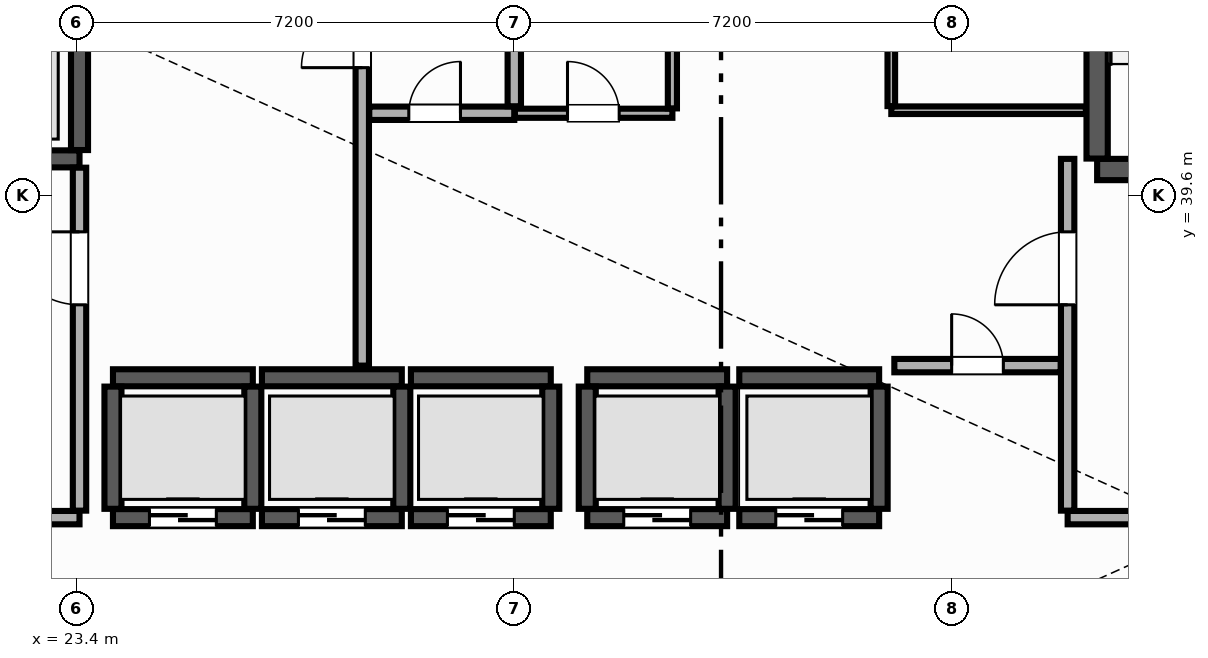
"""IFC4 building model, lengths in metres.
Left out: names, types, materials, properties, quantities, classifications, styles, units other than length and angle.
Written with IfcOpenShell. Run it as: python <this file> out.ifc"""

import sys

from ifc_helpers import new_model, si_unit, direction, frame, frame_2d, origin, place, context, subcontext, project, spatial, rectangle, extrude, element, fill, save


model = new_model("IFC4")
c1 = context("Model", 3, precision=1e-05, world=origin(), true_north=direction((0.0, 1.0)))
c2 = subcontext(c1, "Body", "Model", "MODEL_VIEW")
j1 = project(units=[si_unit("LENGTHUNIT", "METRE"), si_unit("PLANEANGLEUNIT", "RADIAN")], contexts=[c1])
p1 = place(None, origin())
s1 = spatial("IfcSite", under=j1, at=p1, CompositionType="ELEMENT")
p2 = place(p1, origin())
s2 = spatial("IfcBuilding", under=s1, at=p2, CompositionType="ELEMENT")
p3 = place(p2, origin())
s3 = spatial("IfcBuildingStorey", under=s2, at=p3, CompositionType="ELEMENT", Elevation=0.0)
p4 = place(p3, frame((40.185, 40.025, 0.0), z_axis=(0.0, 0.0, 1.0), x_axis=(1.0, 0.0, 0.0)))
e1 = element("IfcWall", 1, at=p4, inside=s3, PredefinedType="SHEAR", context=c2, shape_type="SweptSolid", body=[
    extrude(rectangle(XDim=3.63, YDim=0.35, at=frame_2d((1.815, 0.0))), origin(), (0.0, 0.0, 1.0), 7.68),
])
p5 = place(p4, frame((1.24, 0.0, 0.0)))
e2 = element("IfcOpeningElement", 2, at=p5, cuts=e1, PredefinedType="OPENING", context=c2, shape_type="SweptSolid", body=[
    extrude(rectangle(XDim=1.15, YDim=2.15, at=frame_2d((0.575, 1.075))), frame((0.0, 0.185, 0.0), z_axis=(0.0, -1.0, 0.0), x_axis=(1.0, 0.0, 0.0)), (0.0, 0.0, 1.0), 0.37),
])
p6 = place(p3, frame((40.185, 40.205, 0.0), z_axis=(0.0, 0.0, 1.0), x_axis=(0.0, 1.0, 0.0)))
e3 = element("IfcWall", 3, at=p6, inside=s3, PredefinedType="SHEAR", context=c2, shape_type="SweptSolid", body=[
    extrude(rectangle(XDim=8.09, YDim=0.35, at=frame_2d((4.045, 0.0))), origin(), (0.0, 0.0, 1.0), 7.68),
])
p7 = place(p3, frame((24.0, 34.3, 0.0), z_axis=(0.0, 0.0, 1.0), x_axis=(1.0, 0.0, 0.0)))
e4 = element("IfcWall", 4, at=p7, inside=s3, PredefinedType="SHEAR", context=c2, shape_type="SweptSolid", body=[
    extrude(rectangle(XDim=2.3, YDim=0.28, at=frame_2d((1.15, 0.0))), origin(), (0.0, 0.0, 1.0), 7.68),
])
p8 = place(p7, frame((0.6, 0.0, 0.0)))
e5 = element("IfcOpeningElement", 5, at=p8, cuts=e4, PredefinedType="OPENING", context=c2, shape_type="SweptSolid", body=[
    extrude(rectangle(XDim=1.1, YDim=2.2, at=frame_2d((0.55, 1.1))), frame((0.0, 0.15, 0.0), z_axis=(0.0, -1.0, 0.0), x_axis=(1.0, 0.0, 0.0)), (0.0, 0.0, 1.0), 0.3),
])
p9 = place(p3, frame((24.0, 36.6, 0.0), z_axis=(0.0, 0.0, 1.0), x_axis=(1.0, 0.0, 0.0)))
e6 = element("IfcWall", 6, at=p9, inside=s3, PredefinedType="SHEAR", context=c2, shape_type="SweptSolid", body=[
    extrude(rectangle(XDim=2.3, YDim=0.28, at=frame_2d((1.15, 0.0))), origin(), (0.0, 0.0, 1.0), 7.68),
])
for number, where, z_axis, x_axis in (
    (7, (24.0, 34.445, 0.0), (0.0, 0.0, 1.0), (0.0, 1.0, 0.0)),
    (8, (26.3, 34.445, 0.0), (0.0, 0.0, 1.0), (0.0, 1.0, 0.0)),
):
    element("IfcWall", number, at=place(p3, frame(where, z_axis=z_axis, x_axis=x_axis)), inside=s3, PredefinedType="SHEAR", context=c2, shape_type="SweptSolid", body=[
        extrude(rectangle(XDim=2.01, YDim=0.28, at=frame_2d((1.005, 0.0))), origin(), (0.0, 0.0, 1.0), 7.68),
    ])
p10 = place(p3, frame((26.45, 34.3, 0.0), z_axis=(0.0, 0.0, 1.0), x_axis=(1.0, 0.0, 0.0)))
e9 = element("IfcWall", 9, at=p10, inside=s3, PredefinedType="SHEAR", context=c2, shape_type="SweptSolid", body=[
    extrude(rectangle(XDim=2.3, YDim=0.28, at=frame_2d((1.15, 0.0))), origin(), (0.0, 0.0, 1.0), 7.68),
])
p11 = place(p10, frame((0.6, 0.0, 0.0)))
e10 = element("IfcOpeningElement", 10, at=p11, cuts=e9, PredefinedType="OPENING", context=c2, shape_type="SweptSolid", body=[
    extrude(rectangle(XDim=1.1, YDim=2.2, at=frame_2d((0.55, 1.1))), frame((0.0, 0.15, 0.0), z_axis=(0.0, -1.0, 0.0), x_axis=(1.0, 0.0, 0.0)), (0.0, 0.0, 1.0), 0.3),
])
p12 = place(p3, frame((26.45, 36.6, 0.0), z_axis=(0.0, 0.0, 1.0), x_axis=(1.0, 0.0, 0.0)))
e11 = element("IfcWall", 11, at=p12, inside=s3, PredefinedType="SHEAR", context=c2, shape_type="SweptSolid", body=[
    extrude(rectangle(XDim=2.3, YDim=0.28, at=frame_2d((1.15, 0.0))), origin(), (0.0, 0.0, 1.0), 7.68),
])
p13 = place(p3, frame((28.75, 34.445, 0.0), z_axis=(0.0, 0.0, 1.0), x_axis=(0.0, 1.0, 0.0)))
e12 = element("IfcWall", 12, at=p13, inside=s3, PredefinedType="SHEAR", context=c2, shape_type="SweptSolid", body=[
    extrude(rectangle(XDim=2.01, YDim=0.28, at=frame_2d((1.005, 0.0))), origin(), (0.0, 0.0, 1.0), 7.68),
])
p14 = place(p3, frame((28.9, 34.3, 0.0), z_axis=(0.0, 0.0, 1.0), x_axis=(1.0, 0.0, 0.0)))
e13 = element("IfcWall", 13, at=p14, inside=s3, PredefinedType="SHEAR", context=c2, shape_type="SweptSolid", body=[
    extrude(rectangle(XDim=2.3, YDim=0.28, at=frame_2d((1.15, 0.0))), origin(), (0.0, 0.0, 1.0), 7.68),
])
p15 = place(p14, frame((0.6, 0.0, 0.0)))
e14 = element("IfcOpeningElement", 14, at=p15, cuts=e13, PredefinedType="OPENING", context=c2, shape_type="SweptSolid", body=[
    extrude(rectangle(XDim=1.1, YDim=2.2, at=frame_2d((0.55, 1.1))), frame((0.0, 0.15, 0.0), z_axis=(0.0, -1.0, 0.0), x_axis=(1.0, 0.0, 0.0)), (0.0, 0.0, 1.0), 0.3),
])
p16 = place(p3, frame((28.9, 36.6, 0.0), z_axis=(0.0, 0.0, 1.0), x_axis=(1.0, 0.0, 0.0)))
e15 = element("IfcWall", 15, at=p16, inside=s3, PredefinedType="SHEAR", context=c2, shape_type="SweptSolid", body=[
    extrude(rectangle(XDim=2.3, YDim=0.28, at=frame_2d((1.15, 0.0))), origin(), (0.0, 0.0, 1.0), 7.68),
])
p17 = place(p3, frame((31.2, 34.445, 0.0), z_axis=(0.0, 0.0, 1.0), x_axis=(0.0, 1.0, 0.0)))
e16 = element("IfcWall", 16, at=p17, inside=s3, PredefinedType="SHEAR", context=c2, shape_type="SweptSolid", body=[
    extrude(rectangle(XDim=2.01, YDim=0.28, at=frame_2d((1.005, 0.0))), origin(), (0.0, 0.0, 1.0), 7.68),
])
p18 = place(p3, frame((31.8, 34.3, 0.0), z_axis=(0.0, 0.0, 1.0), x_axis=(1.0, 0.0, 0.0)))
e17 = element("IfcWall", 17, at=p18, inside=s3, PredefinedType="SHEAR", context=c2, shape_type="SweptSolid", body=[
    extrude(rectangle(XDim=2.3, YDim=0.28, at=frame_2d((1.15, 0.0))), origin(), (0.0, 0.0, 1.0), 7.68),
])
p19 = place(p18, frame((0.6, 0.0, 0.0)))
e18 = element("IfcOpeningElement", 18, at=p19, cuts=e17, PredefinedType="OPENING", context=c2, shape_type="SweptSolid", body=[
    extrude(rectangle(XDim=1.1, YDim=2.2, at=frame_2d((0.55, 1.1))), frame((0.0, 0.15, 0.0), z_axis=(0.0, -1.0, 0.0), x_axis=(1.0, 0.0, 0.0)), (0.0, 0.0, 1.0), 0.3),
])
p20 = place(p3, frame((31.8, 36.6, 0.0), z_axis=(0.0, 0.0, 1.0), x_axis=(1.0, 0.0, 0.0)))
e19 = element("IfcWall", 19, at=p20, inside=s3, PredefinedType="SHEAR", context=c2, shape_type="SweptSolid", body=[
    extrude(rectangle(XDim=2.3, YDim=0.28, at=frame_2d((1.15, 0.0))), origin(), (0.0, 0.0, 1.0), 7.68),
])
for number, where, z_axis, x_axis in (
    (20, (31.8, 34.445, 0.0), (0.0, 0.0, 1.0), (0.0, 1.0, 0.0)),
    (21, (34.1, 34.445, 0.0), (0.0, 0.0, 1.0), (0.0, 1.0, 0.0)),
):
    element("IfcWall", number, at=place(p3, frame(where, z_axis=z_axis, x_axis=x_axis)), inside=s3, PredefinedType="SHEAR", context=c2, shape_type="SweptSolid", body=[
        extrude(rectangle(XDim=2.01, YDim=0.28, at=frame_2d((1.005, 0.0))), origin(), (0.0, 0.0, 1.0), 7.68),
    ])
p21 = place(p3, frame((34.3, 34.3, 0.0), z_axis=(0.0, 0.0, 1.0), x_axis=(1.0, 0.0, 0.0)))
e22 = element("IfcWall", 22, at=p21, inside=s3, PredefinedType="SHEAR", context=c2, shape_type="SweptSolid", body=[
    extrude(rectangle(XDim=2.3, YDim=0.28, at=frame_2d((1.15, 0.0))), origin(), (0.0, 0.0, 1.0), 7.68),
])
p22 = place(p21, frame((0.6, 0.0, 0.0)))
e23 = element("IfcOpeningElement", 23, at=p22, cuts=e22, PredefinedType="OPENING", context=c2, shape_type="SweptSolid", body=[
    extrude(rectangle(XDim=1.1, YDim=2.2, at=frame_2d((0.55, 1.1))), frame((0.0, 0.15, 0.0), z_axis=(0.0, -1.0, 0.0), x_axis=(1.0, 0.0, 0.0)), (0.0, 0.0, 1.0), 0.3),
])
p23 = place(p3, frame((34.3, 36.6, 0.0), z_axis=(0.0, 0.0, 1.0), x_axis=(1.0, 0.0, 0.0)))
e24 = element("IfcWall", 24, at=p23, inside=s3, PredefinedType="SHEAR", context=c2, shape_type="SweptSolid", body=[
    extrude(rectangle(XDim=2.3, YDim=0.28, at=frame_2d((1.15, 0.0))), origin(), (0.0, 0.0, 1.0), 7.68),
])
p24 = place(p3, frame((36.6, 34.445, 0.0), z_axis=(0.0, 0.0, 1.0), x_axis=(0.0, 1.0, 0.0)))
e25 = element("IfcWall", 25, at=p24, inside=s3, PredefinedType="SHEAR", context=c2, shape_type="SweptSolid", body=[
    extrude(rectangle(XDim=2.01, YDim=0.28, at=frame_2d((1.005, 0.0))), origin(), (0.0, 0.0, 1.0), 7.68),
])
p25 = place(p3, frame((21.035, 40.2, 0.0), z_axis=(0.0, 0.0, 1.0), x_axis=(1.0, 0.0, 0.0)))
e26 = element("IfcWall", 26, at=p25, inside=s3, PredefinedType="SHEAR", context=c2, shape_type="SweptSolid", body=[
    extrude(rectangle(XDim=2.415, YDim=0.28, at=frame_2d((1.208, 0.0))), origin(), (0.0, 0.0, 1.0), 7.68),
])
p26 = place(p25, frame((0.54, 0.0, 0.0)))
e27 = element("IfcOpeningElement", 27, at=p26, cuts=e26, PredefinedType="OPENING", context=c2, shape_type="SweptSolid", body=[
    extrude(rectangle(XDim=1.3, YDim=2.3, at=frame_2d((0.65, 1.15))), frame((0.0, 0.15, 0.0), z_axis=(0.0, -1.0, 0.0), x_axis=(1.0, 0.0, 0.0)), (0.0, 0.0, 1.0), 0.3),
])
p27 = place(p3, frame((23.45, 40.345, 0.0), z_axis=(0.0, 0.0, 1.0), x_axis=(0.0, 1.0, 0.0)))
e28 = element("IfcWall", 28, at=p27, inside=s3, PredefinedType="SHEAR", context=c2, shape_type="SweptSolid", body=[
    extrude(rectangle(XDim=2.81, YDim=0.28, at=frame_2d((1.405, 0.0))), origin(), (0.0, 0.0, 1.0), 7.68),
])
p28 = place(p3, frame((17.4, 34.3, 0.0), z_axis=(0.0, 0.0, 1.0), x_axis=(1.0, 0.0, 0.0)))
e29 = element("IfcWall", 29, at=p28, inside=s3, PredefinedType="PARTITIONING", context=c2, shape_type="SweptSolid", body=[
    extrude(rectangle(XDim=6.05, YDim=0.22, at=frame_2d((3.025, 0.0))), origin(), (0.0, 0.0, 1.0), 7.68),
])
p29 = place(p28, frame((2.2, 0.0, 0.0)))
e30 = element("IfcOpeningElement", 30, at=p29, cuts=e29, PredefinedType="OPENING", context=c2, shape_type="SweptSolid", body=[
    extrude(rectangle(XDim=1.2, YDim=2.15, at=frame_2d((0.6, 1.075))), frame((0.0, 0.12, 0.0), z_axis=(0.0, -1.0, 0.0), x_axis=(1.0, 0.0, 0.0)), (0.0, 0.0, 1.0), 0.24),
])
p30 = place(p3, frame((23.45, 34.415, 0.0), z_axis=(0.0, 0.0, 1.0), x_axis=(0.0, 1.0, 0.0)))
e31 = element("IfcWall", 31, at=p30, inside=s3, PredefinedType="PARTITIONING", context=c2, shape_type="SweptSolid", body=[
    extrude(rectangle(XDim=5.64, YDim=0.22, at=frame_2d((2.82, 0.0))), origin(), (0.0, 0.0, 1.0), 7.68),
])
p31 = place(p30, frame((3.385, 0.0, 0.0)))
e32 = element("IfcOpeningElement", 32, at=p31, cuts=e31, PredefinedType="OPENING", context=c2, shape_type="SweptSolid", body=[
    extrude(rectangle(XDim=1.2, YDim=2.15, at=frame_2d((0.6, 1.075))), frame((0.0, 0.12, 0.0), z_axis=(0.0, -1.0, 0.0), x_axis=(1.0, 0.0, 0.0)), (0.0, 0.0, 1.0), 0.24),
])
p32 = place(p3, frame((39.7, 34.3, 0.0), z_axis=(0.0, 0.0, 1.0), x_axis=(1.0, 0.0, 0.0)))
e33 = element("IfcWall", 33, at=p32, inside=s3, PredefinedType="PARTITIONING", context=c2, shape_type="SweptSolid", body=[
    extrude(rectangle(XDim=4.6, YDim=0.22, at=frame_2d((2.3, 0.0))), origin(), (0.0, 0.0, 1.0), 7.68),
])
p33 = place(p32, frame((1.7, 0.0, 0.0)))
e34 = element("IfcOpeningElement", 34, at=p33, cuts=e33, PredefinedType="OPENING", context=c2, shape_type="SweptSolid", body=[
    extrude(rectangle(XDim=1.2, YDim=2.15, at=frame_2d((0.6, 1.075))), frame((0.0, 0.12, 0.0), z_axis=(0.0, -1.0, 0.0), x_axis=(1.0, 0.0, 0.0)), (0.0, 0.0, 1.0), 0.24),
])
p34 = place(p3, frame((39.7, 34.415, 0.0), z_axis=(0.0, 0.0, 1.0), x_axis=(0.0, 1.0, 0.0)))
e35 = element("IfcWall", 35, at=p34, inside=s3, PredefinedType="PARTITIONING", context=c2, shape_type="SweptSolid", body=[
    extrude(rectangle(XDim=5.785, YDim=0.22, at=frame_2d((2.893, 0.0))), origin(), (0.0, 0.0, 1.0), 7.68),
])
p35 = place(p34, frame((3.385, 0.0, 0.0)))
e36 = element("IfcOpeningElement", 36, at=p35, cuts=e35, PredefinedType="OPENING", context=c2, shape_type="SweptSolid", body=[
    extrude(rectangle(XDim=1.2, YDim=2.15, at=frame_2d((0.6, 1.075))), frame((0.0, 0.12, 0.0), z_axis=(0.0, -1.0, 0.0), x_axis=(1.0, 0.0, 0.0)), (0.0, 0.0, 1.0), 0.24),
])
p36 = place(p3, frame((28.1, 36.8, 0.0), z_axis=(0.0, 0.0, 1.0), x_axis=(0.0, 1.0, 0.0)))
e37 = element("IfcWall", 37, at=p36, inside=s3, PredefinedType="PARTITIONING", context=c2, shape_type="SweptSolid", body=[
    extrude(rectangle(XDim=12.045, YDim=0.22, at=frame_2d((6.022, 0.0))), origin(), (0.0, 0.0, 1.0), 7.68),
])
p37 = place(p36, frame((4.9, 0.0, 0.0)))
e38 = element("IfcOpeningElement", 38, at=p37, cuts=e37, PredefinedType="OPENING", context=c2, shape_type="SweptSolid", body=[
    extrude(rectangle(XDim=1.0, YDim=2.15, at=frame_2d((0.5, 1.075))), frame((0.0, 0.12, 0.0), z_axis=(0.0, -1.0, 0.0), x_axis=(1.0, 0.0, 0.0)), (0.0, 0.0, 1.0), 0.24),
])
p38 = place(p3, frame((28.215, 40.95, 0.0), z_axis=(0.0, 0.0, 1.0), x_axis=(1.0, 0.0, 0.0)))
e39 = element("IfcWall", 39, at=p38, inside=s3, PredefinedType="PARTITIONING", context=c2, shape_type="SweptSolid", body=[
    extrude(rectangle(XDim=2.385, YDim=0.22, at=frame_2d((1.192, 0.0))), origin(), (0.0, 0.0, 1.0), 7.68),
])
p39 = place(p38, frame((0.65, 0.0, 0.0)))
e40 = element("IfcOpeningElement", 40, at=p39, cuts=e39, PredefinedType="OPENING", context=c2, shape_type="SweptSolid", body=[
    extrude(rectangle(XDim=0.85, YDim=2.1, at=frame_2d((0.425, 1.05))), frame((0.0, 0.12, 0.0), z_axis=(0.0, -1.0, 0.0), x_axis=(1.0, 0.0, 0.0)), (0.0, 0.0, 1.0), 0.24),
])
p40 = place(p3, frame((30.6, 41.065, 0.0), z_axis=(0.0, 0.0, 1.0), x_axis=(0.0, 1.0, 0.0)))
e41 = element("IfcWall", 41, at=p40, inside=s3, PredefinedType="PARTITIONING", context=c2, shape_type="SweptSolid", body=[
    extrude(rectangle(XDim=7.78, YDim=0.22, at=frame_2d((3.89, 0.0))), origin(), (0.0, 0.0, 1.0), 7.68),
])
p41 = place(p3, frame((30.61, 40.95, 0.0), z_axis=(0.0, 0.0, 1.0), x_axis=(1.0, 0.0, 0.0)))
e42 = element("IfcWall", 42, at=p41, inside=s3, PredefinedType="PARTITIONING", context=c2, shape_type="SweptSolid", body=[
    extrude(rectangle(XDim=2.59, YDim=0.15, at=frame_2d((1.295, 0.0))), origin(), (0.0, 0.0, 1.0), 7.68),
])
p42 = place(p41, frame((0.865, 0.0, 0.0)))
e43 = element("IfcOpeningElement", 43, at=p42, cuts=e42, PredefinedType="OPENING", context=c2, shape_type="SweptSolid", body=[
    extrude(rectangle(XDim=0.85, YDim=2.1, at=frame_2d((0.425, 1.05))), frame((0.0, 0.085, 0.0), z_axis=(0.0, -1.0, 0.0), x_axis=(1.0, 0.0, 0.0)), (0.0, 0.0, 1.0), 0.17),
])
p43 = place(p3, frame((33.2, 41.03, 0.0), z_axis=(0.0, 0.0, 1.0), x_axis=(0.0, 1.0, 0.0)))
e44 = element("IfcWall", 44, at=p43, inside=s3, PredefinedType="PARTITIONING", context=c2, shape_type="SweptSolid", body=[
    extrude(rectangle(XDim=7.815, YDim=0.15, at=frame_2d((3.907, 0.0))), origin(), (0.0, 0.0, 1.0), 7.68),
])
p44 = place(p3, frame((36.8, 41.0, 0.0), z_axis=(0.0, 0.0, 1.0), x_axis=(1.0, 0.0, 0.0)))
e45 = element("IfcWall", 45, at=p44, inside=s3, PredefinedType="PARTITIONING", context=c2, shape_type="SweptSolid", body=[
    extrude(rectangle(XDim=3.2, YDim=0.125, at=frame_2d((1.6, 0.0))), origin(), (0.0, 0.0, 1.0), 7.68),
])
p45 = place(p3, frame((36.8, 41.067, 0.0), z_axis=(0.0, 0.0, 1.0), x_axis=(0.0, 1.0, 0.0)))
e46 = element("IfcWall", 46, at=p45, inside=s3, PredefinedType="PARTITIONING", context=c2, shape_type="SweptSolid", body=[
    extrude(rectangle(XDim=3.665, YDim=0.125, at=frame_2d((1.833, 0.0))), origin(), (0.0, 0.0, 1.0), 7.68),
])
p46 = place(p45, frame((1.383, 0.0, 0.0)))
e47 = element("IfcOpeningElement", 47, at=p46, cuts=e46, PredefinedType="OPENING", context=c2, shape_type="SweptSolid", body=[
    extrude(rectangle(XDim=0.9, YDim=2.1, at=frame_2d((0.45, 1.05))), frame((0.0, 0.073, 0.0), z_axis=(0.0, -1.0, 0.0), x_axis=(1.0, 0.0, 0.0)), (0.0, 0.0, 1.0), 0.145),
])
p47 = place(p3, frame((36.85, 36.8, 0.0), z_axis=(0.0, 0.0, 1.0), x_axis=(1.0, 0.0, 0.0)))
e48 = element("IfcWall", 48, at=p47, inside=s3, PredefinedType="PARTITIONING", context=c2, shape_type="SweptSolid", body=[
    extrude(rectangle(XDim=2.735, YDim=0.22, at=frame_2d((1.367, 0.0))), origin(), (0.0, 0.0, 1.0), 7.68),
])
p48 = place(p47, frame((0.942, 0.0, 0.0)))
e49 = element("IfcOpeningElement", 49, at=p48, cuts=e48, PredefinedType="OPENING", context=c2, shape_type="SweptSolid", body=[
    extrude(rectangle(XDim=0.85, YDim=2.1, at=frame_2d((0.425, 1.05))), frame((0.0, 0.12, 0.0), z_axis=(0.0, -1.0, 0.0), x_axis=(1.0, 0.0, 0.0)), (0.0, 0.0, 1.0), 0.24),
])
p49 = place(p8, origin())
e50 = element("IfcDoor", 50, at=p49, inside=s3, OperationType="DOUBLE_DOOR_SLIDING", PredefinedType="DOOR", context=c2, shape_type="SweptSolid", body=[
    extrude(rectangle(XDim=1.1, YDim=2.2, at=frame_2d((0.55, 1.1))), frame((0.0, 0.025, 0.0), z_axis=(0.0, -1.0, 0.0), x_axis=(1.0, 0.0, 0.0)), (0.0, 0.0, 1.0), 0.05),
])
fill(e5, e50)
p50 = place(p11, origin())
e51 = element("IfcDoor", 51, at=p50, inside=s3, OperationType="DOUBLE_DOOR_SLIDING", PredefinedType="DOOR", context=c2, shape_type="SweptSolid", body=[
    extrude(rectangle(XDim=1.1, YDim=2.2, at=frame_2d((0.55, 1.1))), frame((0.0, 0.025, 0.0), z_axis=(0.0, -1.0, 0.0), x_axis=(1.0, 0.0, 0.0)), (0.0, 0.0, 1.0), 0.05),
])
fill(e10, e51)
p51 = place(p15, origin())
e52 = element("IfcDoor", 52, at=p51, inside=s3, OperationType="DOUBLE_DOOR_SLIDING", PredefinedType="DOOR", context=c2, shape_type="SweptSolid", body=[
    extrude(rectangle(XDim=1.1, YDim=2.2, at=frame_2d((0.55, 1.1))), frame((0.0, 0.025, 0.0), z_axis=(0.0, -1.0, 0.0), x_axis=(1.0, 0.0, 0.0)), (0.0, 0.0, 1.0), 0.05),
])
fill(e14, e52)
p52 = place(p19, origin())
e53 = element("IfcDoor", 53, at=p52, inside=s3, OperationType="DOUBLE_DOOR_SLIDING", PredefinedType="DOOR", context=c2, shape_type="SweptSolid", body=[
    extrude(rectangle(XDim=1.1, YDim=2.2, at=frame_2d((0.55, 1.1))), frame((0.0, 0.025, 0.0), z_axis=(0.0, -1.0, 0.0), x_axis=(1.0, 0.0, 0.0)), (0.0, 0.0, 1.0), 0.05),
])
fill(e18, e53)
p53 = place(p22, origin())
e54 = element("IfcDoor", 54, at=p53, inside=s3, OperationType="DOUBLE_DOOR_SLIDING", PredefinedType="DOOR", context=c2, shape_type="SweptSolid", body=[
    extrude(rectangle(XDim=1.1, YDim=2.2, at=frame_2d((0.55, 1.1))), frame((0.0, 0.025, 0.0), z_axis=(0.0, -1.0, 0.0), x_axis=(1.0, 0.0, 0.0)), (0.0, 0.0, 1.0), 0.05),
])
fill(e23, e54)
p54 = place(p37, origin())
e55 = element("IfcDoor", 55, at=p54, inside=s3, OperationType="SINGLE_SWING_LEFT", PredefinedType="DOOR", context=c2, shape_type="SweptSolid", body=[
    extrude(rectangle(XDim=1.0, YDim=2.15, at=frame_2d((0.5, 1.075))), frame((0.0, 0.025, 0.0), z_axis=(0.0, -1.0, 0.0), x_axis=(1.0, 0.0, 0.0)), (0.0, 0.0, 1.0), 0.05),
])
fill(e38, e55)
p55 = place(p39, origin())
e56 = element("IfcDoor", 56, at=p55, inside=s3, OperationType="SINGLE_SWING_RIGHT", PredefinedType="DOOR", context=c2, shape_type="SweptSolid", body=[
    extrude(rectangle(XDim=0.85, YDim=2.1, at=frame_2d((0.425, 1.05))), frame((0.0, 0.025, 0.0), z_axis=(0.0, -1.0, 0.0), x_axis=(1.0, 0.0, 0.0)), (0.0, 0.0, 1.0), 0.05),
])
fill(e40, e56)
p56 = place(p42, origin())
e57 = element("IfcDoor", 57, at=p56, inside=s3, OperationType="SINGLE_SWING_LEFT", PredefinedType="DOOR", context=c2, shape_type="SweptSolid", body=[
    extrude(rectangle(XDim=0.85, YDim=2.1, at=frame_2d((0.425, 1.05))), frame((0.0, 0.025, 0.0), z_axis=(0.0, -1.0, 0.0), x_axis=(1.0, 0.0, 0.0)), (0.0, 0.0, 1.0), 0.05),
])
fill(e43, e57)
p57 = place(p48, origin())
e58 = element("IfcDoor", 58, at=p57, inside=s3, OperationType="SINGLE_SWING_LEFT", PredefinedType="DOOR", context=c2, shape_type="SweptSolid", body=[
    extrude(rectangle(XDim=0.85, YDim=2.1, at=frame_2d((0.425, 1.05))), frame((0.0, 0.025, 0.0), z_axis=(0.0, -1.0, 0.0), x_axis=(1.0, 0.0, 0.0)), (0.0, 0.0, 1.0), 0.05),
])
fill(e49, e58)
p58 = place(p31, origin())
e59 = element("IfcDoor", 59, at=p58, inside=s3, OperationType="SINGLE_SWING_RIGHT", PredefinedType="DOOR", context=c2, shape_type="SweptSolid", body=[
    extrude(rectangle(XDim=1.2, YDim=2.15, at=frame_2d((0.6, 1.075))), frame((0.0, 0.025, 0.0), z_axis=(0.0, -1.0, 0.0), x_axis=(1.0, 0.0, 0.0)), (0.0, 0.0, 1.0), 0.05),
])
fill(e32, e59)
p59 = place(p35, origin())
e60 = element("IfcDoor", 60, at=p59, inside=s3, OperationType="SINGLE_SWING_LEFT", PredefinedType="DOOR", context=c2, shape_type="SweptSolid", body=[
    extrude(rectangle(XDim=1.2, YDim=2.15, at=frame_2d((0.6, 1.075))), frame((0.0, 0.025, 0.0), z_axis=(0.0, -1.0, 0.0), x_axis=(1.0, 0.0, 0.0)), (0.0, 0.0, 1.0), 0.05),
])
fill(e36, e60)
save(model, sys.argv[1])
